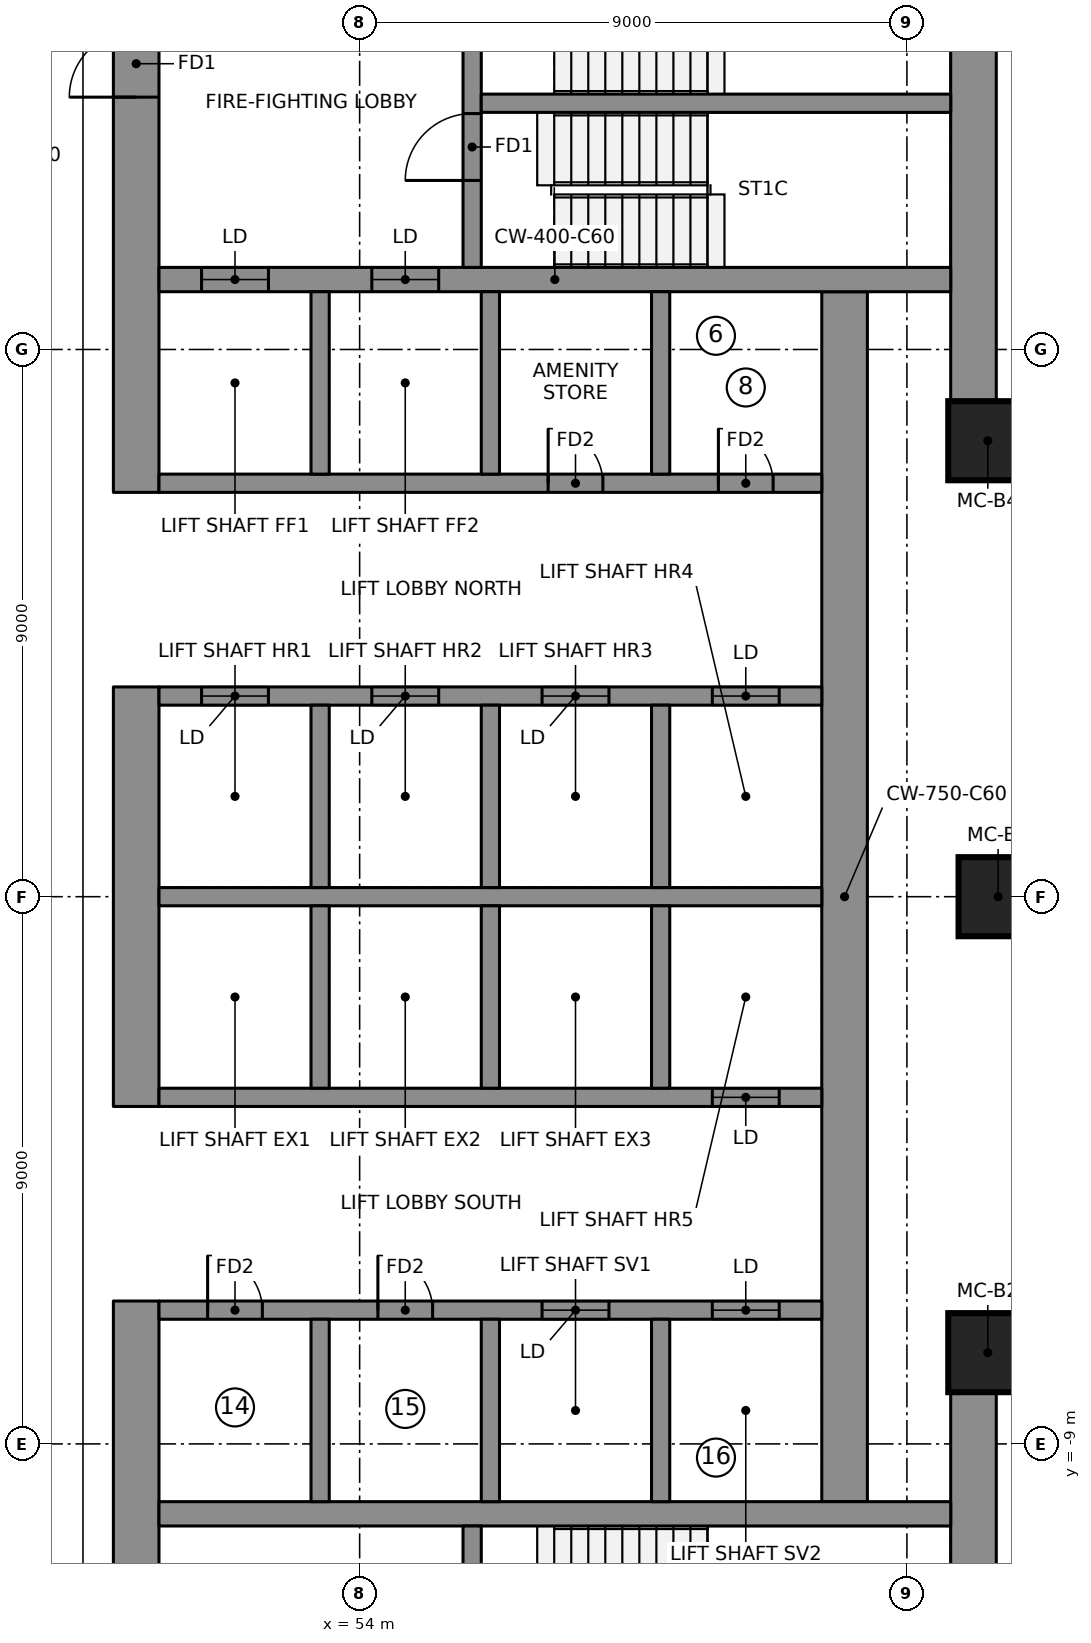
"""IFC4 building model, lengths in metres.
Left out: names, types, materials, properties, quantities, classifications, styles, units other than length and angle.
Written with IfcOpenShell. Run it as: python <this file> out.ifc"""

import sys

from ifc_helpers import new_model, si_unit, direction, frame, frame_2d, origin, origin_2d, place, context, subcontext, project, spatial, rectangle, extrude, element, fill, save


model = new_model("IFC4")
c1 = context("Model", 3, precision=1e-05, world=origin(), true_north=direction((0.0, 1.0)))
c2 = subcontext(c1, "Body", "Model", "MODEL_VIEW")
j1 = project(units=[si_unit("LENGTHUNIT", "METRE"), si_unit("PLANEANGLEUNIT", "RADIAN")], contexts=[c1])
p1 = place(None, origin())
s1 = spatial("IfcSite", under=j1, at=p1, CompositionType="ELEMENT")
p2 = place(p1, origin())
s2 = spatial("IfcBuilding", under=s1, at=p2, CompositionType="ELEMENT")
p3 = place(p2, frame((0.0, 0.0, 189.7)))
s3 = spatial("IfcBuildingStorey", under=s2, at=p3, CompositionType="ELEMENT", Elevation=189.7)
p4 = place(p3, frame((50.325, 6.65, 0.0), z_axis=(0.0, 0.0, 1.0), x_axis=(0.0, 1.0, 0.0)))
e1 = element("IfcWall", 1, at=p4, inside=s3, PredefinedType="SHEAR", context=c2, shape_type="SweptSolid", body=[
    extrude(rectangle(XDim=9.85, YDim=0.75, at=frame_2d((4.925, 0.0))), origin(), (0.0, 0.0, 1.0), 3.55),
])
p5 = place(p4, frame((6.5, 0.0, 0.0)))
e2 = element("IfcOpeningElement", 2, at=p5, cuts=e1, PredefinedType="OPENING", context=c2, shape_type="SweptSolid", body=[
    extrude(rectangle(XDim=1.1, YDim=2.1, at=frame_2d((0.55, 1.05))), frame((0.0, 0.385, 0.0), z_axis=(0.0, -1.0, 0.0), x_axis=(1.0, 0.0, 0.0)), (0.0, 0.0, 1.0), 0.77),
])
p6 = place(p3, frame((50.325, -3.45, 0.0), z_axis=(0.0, 0.0, 1.0), x_axis=(0.0, 1.0, 0.0)))
e3 = element("IfcWall", 3, at=p6, inside=s3, PredefinedType="SHEAR", context=c2, shape_type="SweptSolid", body=[
    extrude(rectangle(XDim=6.9, YDim=0.75, at=frame_2d((3.45, 0.0))), origin(), (0.0, 0.0, 1.0), 3.55),
])
p7 = place(p3, frame((50.325, -16.5, 0.0), z_axis=(0.0, 0.0, 1.0), x_axis=(0.0, 1.0, 0.0)))
e4 = element("IfcWall", 4, at=p7, inside=s3, PredefinedType="SHEAR", context=c2, shape_type="SweptSolid", body=[
    extrude(rectangle(XDim=9.85, YDim=0.75, at=frame_2d((4.925, 0.0))), origin(), (0.0, 0.0, 1.0), 3.55),
])
p8 = place(p7, frame((2.25, 0.0, 0.0)))
e5 = element("IfcOpeningElement", 5, at=p8, cuts=e4, PredefinedType="OPENING", context=c2, shape_type="SweptSolid", body=[
    extrude(rectangle(XDim=1.1, YDim=2.1, at=frame_2d((0.55, 1.05))), frame((0.0, 0.385, 0.0), z_axis=(0.0, -1.0, 0.0), x_axis=(1.0, 0.0, 0.0)), (0.0, 0.0, 1.0), 0.77),
])
for number, where, z_axis, x_axis in (
    (6, (64.095, 8.099, 0.0), (0.0, 0.0, 1.0), (0.0, 1.0, 0.0)),
    (7, (64.095, -15.75, 0.0), (0.0, 0.0, 1.0), (0.0, 1.0, 0.0)),
):
    element("IfcWall", number, at=place(p3, frame(where, z_axis=z_axis, x_axis=x_axis)), inside=s3, PredefinedType="SHEAR", context=c2, shape_type="SweptSolid", body=[
        extrude(rectangle(XDim=7.651, YDim=0.75, at=frame_2d((3.825, 0.0))), origin(), (0.0, 0.0, 1.0), 3.55),
    ])
p9 = place(p3, frame((61.975, -9.95, 0.0), z_axis=(0.0, 0.0, 1.0), x_axis=(0.0, 1.0, 0.0)))
e8 = element("IfcWall", 8, at=p9, inside=s3, PredefinedType="SHEAR", context=c2, shape_type="SweptSolid", body=[
    extrude(rectangle(XDim=19.9, YDim=0.75, at=frame_2d((9.95, 0.0))), origin(), (0.0, 0.0, 1.0), 3.55),
])
p10 = place(p3, frame((50.7, 10.15, 0.0), z_axis=(0.0, 0.0, 1.0), x_axis=(1.0, 0.0, 0.0)))
e9 = element("IfcWall", 9, at=p10, inside=s3, PredefinedType="SHEAR", context=c2, shape_type="SweptSolid", body=[
    extrude(rectangle(XDim=13.02, YDim=0.4, at=frame_2d((6.51, 0.0))), origin(), (0.0, 0.0, 1.0), 3.55),
])
p11 = place(p10, frame((0.7, 0.0, 0.0)))
e10 = element("IfcOpeningElement", 10, at=p11, cuts=e9, PredefinedType="OPENING", context=c2, shape_type="SweptSolid", body=[
    extrude(rectangle(XDim=1.1, YDim=2.1, at=frame_2d((0.55, 1.05))), frame((0.0, 0.21, 0.0), z_axis=(0.0, -1.0, 0.0), x_axis=(1.0, 0.0, 0.0)), (0.0, 0.0, 1.0), 0.42),
])
p12 = place(p10, frame((3.5, 0.0, 0.0)))
e11 = element("IfcOpeningElement", 11, at=p12, cuts=e9, PredefinedType="OPENING", context=c2, shape_type="SweptSolid", body=[
    extrude(rectangle(XDim=1.1, YDim=2.1, at=frame_2d((0.55, 1.05))), frame((0.0, 0.21, 0.0), z_axis=(0.0, -1.0, 0.0), x_axis=(1.0, 0.0, 0.0)), (0.0, 0.0, 1.0), 0.42),
])
p13 = place(p3, frame((50.7, -10.15, 0.0), z_axis=(0.0, 0.0, 1.0), x_axis=(1.0, 0.0, 0.0)))
e12 = element("IfcWall", 12, at=p13, inside=s3, PredefinedType="SHEAR", context=c2, shape_type="SweptSolid", body=[
    extrude(rectangle(XDim=13.02, YDim=0.4, at=frame_2d((6.51, 0.0))), origin(), (0.0, 0.0, 1.0), 3.55),
])
p14 = place(p3, frame((50.7, 0.0, 0.0), z_axis=(0.0, 0.0, 1.0), x_axis=(1.0, 0.0, 0.0)))
e13 = element("IfcWall", 13, at=p14, inside=s3, PredefinedType="SHEAR", context=c2, shape_type="SweptSolid", body=[
    extrude(rectangle(XDim=10.9, YDim=0.3, at=frame_2d((5.45, 0.0))), origin(), (0.0, 0.0, 1.0), 3.55),
])
p15 = place(p3, frame((50.7, 3.3, 0.0), z_axis=(0.0, 0.0, 1.0), x_axis=(1.0, 0.0, 0.0)))
e14 = element("IfcWall", 14, at=p15, inside=s3, PredefinedType="SHEAR", context=c2, shape_type="SweptSolid", body=[
    extrude(rectangle(XDim=10.9, YDim=0.3, at=frame_2d((5.45, 0.0))), origin(), (0.0, 0.0, 1.0), 3.55),
])
p16 = place(p15, frame((0.7, 0.0, 0.0)))
e15 = element("IfcOpeningElement", 15, at=p16, cuts=e14, PredefinedType="OPENING", context=c2, shape_type="SweptSolid", body=[
    extrude(rectangle(XDim=1.1, YDim=2.1, at=frame_2d((0.55, 1.05))), frame((0.0, 0.16, 0.0), z_axis=(0.0, -1.0, 0.0), x_axis=(1.0, 0.0, 0.0)), (0.0, 0.0, 1.0), 0.32),
])
p17 = place(p15, frame((3.5, 0.0, 0.0)))
e16 = element("IfcOpeningElement", 16, at=p17, cuts=e14, PredefinedType="OPENING", context=c2, shape_type="SweptSolid", body=[
    extrude(rectangle(XDim=1.1, YDim=2.1, at=frame_2d((0.55, 1.05))), frame((0.0, 0.16, 0.0), z_axis=(0.0, -1.0, 0.0), x_axis=(1.0, 0.0, 0.0)), (0.0, 0.0, 1.0), 0.32),
])
p18 = place(p15, frame((6.3, 0.0, 0.0)))
e17 = element("IfcOpeningElement", 17, at=p18, cuts=e14, PredefinedType="OPENING", context=c2, shape_type="SweptSolid", body=[
    extrude(rectangle(XDim=1.1, YDim=2.1, at=frame_2d((0.55, 1.05))), frame((0.0, 0.16, 0.0), z_axis=(0.0, -1.0, 0.0), x_axis=(1.0, 0.0, 0.0)), (0.0, 0.0, 1.0), 0.32),
])
p19 = place(p15, frame((9.1, 0.0, 0.0)))
e18 = element("IfcOpeningElement", 18, at=p19, cuts=e14, PredefinedType="OPENING", context=c2, shape_type="SweptSolid", body=[
    extrude(rectangle(XDim=1.1, YDim=2.1, at=frame_2d((0.55, 1.05))), frame((0.0, 0.16, 0.0), z_axis=(0.0, -1.0, 0.0), x_axis=(1.0, 0.0, 0.0)), (0.0, 0.0, 1.0), 0.32),
])
p20 = place(p3, frame((50.7, 6.8, 0.0), z_axis=(0.0, 0.0, 1.0), x_axis=(1.0, 0.0, 0.0)))
e19 = element("IfcWall", 19, at=p20, inside=s3, PredefinedType="SHEAR", context=c2, shape_type="SweptSolid", body=[
    extrude(rectangle(XDim=10.9, YDim=0.3, at=frame_2d((5.45, 0.0))), origin(), (0.0, 0.0, 1.0), 3.55),
])
p21 = place(p20, frame((6.4, 0.0, 0.0)))
e20 = element("IfcOpeningElement", 20, at=p21, cuts=e19, PredefinedType="OPENING", context=c2, shape_type="SweptSolid", body=[
    extrude(rectangle(XDim=0.9, YDim=2.1, at=frame_2d((0.45, 1.05))), frame((0.0, 0.16, 0.0), z_axis=(0.0, -1.0, 0.0), x_axis=(1.0, 0.0, 0.0)), (0.0, 0.0, 1.0), 0.32),
])
p22 = place(p20, frame((9.2, 0.0, 0.0)))
e21 = element("IfcOpeningElement", 21, at=p22, cuts=e19, PredefinedType="OPENING", context=c2, shape_type="SweptSolid", body=[
    extrude(rectangle(XDim=0.9, YDim=2.1, at=frame_2d((0.45, 1.05))), frame((0.0, 0.16, 0.0), z_axis=(0.0, -1.0, 0.0), x_axis=(1.0, 0.0, 0.0)), (0.0, 0.0, 1.0), 0.32),
])
for number, where, z_axis, x_axis in (
    (22, (53.35, 0.15, 0.0), (0.0, 0.0, 1.0), (0.0, 1.0, 0.0)),
    (23, (53.35, 6.95, 0.0), (0.0, 0.0, 1.0), (0.0, 1.0, 0.0)),
    (24, (56.15, 0.15, 0.0), (0.0, 0.0, 1.0), (0.0, 1.0, 0.0)),
    (25, (56.15, 6.95, 0.0), (0.0, 0.0, 1.0), (0.0, 1.0, 0.0)),
    (26, (58.95, 0.15, 0.0), (0.0, 0.0, 1.0), (0.0, 1.0, 0.0)),
    (27, (58.95, 6.95, 0.0), (0.0, 0.0, 1.0), (0.0, 1.0, 0.0)),
):
    element("IfcWall", number, at=place(p3, frame(where, z_axis=z_axis, x_axis=x_axis)), inside=s3, PredefinedType="SHEAR", context=c2, shape_type="SweptSolid", body=[
        extrude(rectangle(XDim=3.0, YDim=0.3, at=frame_2d((1.5, 0.0))), origin(), (0.0, 0.0, 1.0), 3.55),
    ])
p23 = place(p3, frame((50.7, -3.3, 0.0), z_axis=(0.0, 0.0, 1.0), x_axis=(1.0, 0.0, 0.0)))
e28 = element("IfcWall", 28, at=p23, inside=s3, PredefinedType="SHEAR", context=c2, shape_type="SweptSolid", body=[
    extrude(rectangle(XDim=10.9, YDim=0.3, at=frame_2d((5.45, 0.0))), origin(), (0.0, 0.0, 1.0), 3.55),
])
p24 = place(p23, frame((9.1, 0.0, 0.0)))
e29 = element("IfcOpeningElement", 29, at=p24, cuts=e28, PredefinedType="OPENING", context=c2, shape_type="SweptSolid", body=[
    extrude(rectangle(XDim=1.1, YDim=2.1, at=frame_2d((0.55, 1.05))), frame((0.0, 0.16, 0.0), z_axis=(0.0, -1.0, 0.0), x_axis=(1.0, 0.0, 0.0)), (0.0, 0.0, 1.0), 0.32),
])
p25 = place(p3, frame((50.7, -6.8, 0.0), z_axis=(0.0, 0.0, 1.0), x_axis=(1.0, 0.0, 0.0)))
e30 = element("IfcWall", 30, at=p25, inside=s3, PredefinedType="SHEAR", context=c2, shape_type="SweptSolid", body=[
    extrude(rectangle(XDim=10.9, YDim=0.3, at=frame_2d((5.45, 0.0))), origin(), (0.0, 0.0, 1.0), 3.55),
])
p26 = place(p25, frame((6.3, 0.0, 0.0)))
e31 = element("IfcOpeningElement", 31, at=p26, cuts=e30, PredefinedType="OPENING", context=c2, shape_type="SweptSolid", body=[
    extrude(rectangle(XDim=1.1, YDim=2.1, at=frame_2d((0.55, 1.05))), frame((0.0, 0.16, 0.0), z_axis=(0.0, -1.0, 0.0), x_axis=(1.0, 0.0, 0.0)), (0.0, 0.0, 1.0), 0.32),
])
p27 = place(p25, frame((9.1, 0.0, 0.0)))
e32 = element("IfcOpeningElement", 32, at=p27, cuts=e30, PredefinedType="OPENING", context=c2, shape_type="SweptSolid", body=[
    extrude(rectangle(XDim=1.1, YDim=2.1, at=frame_2d((0.55, 1.05))), frame((0.0, 0.16, 0.0), z_axis=(0.0, -1.0, 0.0), x_axis=(1.0, 0.0, 0.0)), (0.0, 0.0, 1.0), 0.32),
])
p28 = place(p25, frame((0.8, 0.0, 0.0)))
e33 = element("IfcOpeningElement", 33, at=p28, cuts=e30, PredefinedType="OPENING", context=c2, shape_type="SweptSolid", body=[
    extrude(rectangle(XDim=0.9, YDim=2.1, at=frame_2d((0.45, 1.05))), frame((0.0, 0.16, 0.0), z_axis=(0.0, -1.0, 0.0), x_axis=(1.0, 0.0, 0.0)), (0.0, 0.0, 1.0), 0.32),
])
p29 = place(p25, frame((3.6, 0.0, 0.0)))
e34 = element("IfcOpeningElement", 34, at=p29, cuts=e30, PredefinedType="OPENING", context=c2, shape_type="SweptSolid", body=[
    extrude(rectangle(XDim=0.9, YDim=2.1, at=frame_2d((0.45, 1.05))), frame((0.0, 0.16, 0.0), z_axis=(0.0, -1.0, 0.0), x_axis=(1.0, 0.0, 0.0)), (0.0, 0.0, 1.0), 0.32),
])
for number, where, z_axis, x_axis in (
    (35, (53.35, -3.15, 0.0), (0.0, 0.0, 1.0), (0.0, 1.0, 0.0)),
    (36, (53.35, -9.95, 0.0), (0.0, 0.0, 1.0), (0.0, 1.0, 0.0)),
    (37, (56.15, -3.15, 0.0), (0.0, 0.0, 1.0), (0.0, 1.0, 0.0)),
    (38, (56.15, -9.95, 0.0), (0.0, 0.0, 1.0), (0.0, 1.0, 0.0)),
    (39, (58.95, -3.15, 0.0), (0.0, 0.0, 1.0), (0.0, 1.0, 0.0)),
    (40, (58.95, -9.95, 0.0), (0.0, 0.0, 1.0), (0.0, 1.0, 0.0)),
):
    element("IfcWall", number, at=place(p3, frame(where, z_axis=z_axis, x_axis=x_axis)), inside=s3, PredefinedType="SHEAR", context=c2, shape_type="SweptSolid", body=[
        extrude(rectangle(XDim=3.0, YDim=0.3, at=frame_2d((1.5, 0.0))), origin(), (0.0, 0.0, 1.0), 3.55),
    ])
p30 = place(p3, frame((55.85, 10.35, 0.0), z_axis=(0.0, 0.0, 1.0), x_axis=(0.0, 1.0, 0.0)))
e41 = element("IfcWall", 41, at=p30, inside=s3, PredefinedType="SHEAR", context=c2, shape_type="SweptSolid", body=[
    extrude(rectangle(XDim=5.4, YDim=0.3, at=frame_2d((2.7, 0.0))), origin(), (0.0, 0.0, 1.0), 3.55),
])
p31 = place(p30, frame((1.43, 0.0, 0.0)))
e42 = element("IfcOpeningElement", 42, at=p31, cuts=e41, PredefinedType="OPENING", context=c2, shape_type="SweptSolid", body=[
    extrude(rectangle(XDim=1.1, YDim=2.1, at=frame_2d((0.55, 1.05))), frame((0.0, 0.16, 0.0), z_axis=(0.0, -1.0, 0.0), x_axis=(1.0, 0.0, 0.0)), (0.0, 0.0, 1.0), 0.32),
])
p32 = place(p30, frame((3.6, 0.0, 0.0)))
e43 = element("IfcOpeningElement", 43, at=p32, cuts=e41, PredefinedType="OPENING", context=c2, shape_type="SweptSolid", body=[
    extrude(rectangle(XDim=1.1, YDim=2.1, at=frame_2d((0.55, 1.05))), frame((0.0, 0.16, 0.0), z_axis=(0.0, -1.0, 0.0), x_axis=(1.0, 0.0, 0.0)), (0.0, 0.0, 1.0), 0.32),
])
p33 = place(p3, frame((55.85, -15.75, 0.0), z_axis=(0.0, 0.0, 1.0), x_axis=(0.0, 1.0, 0.0)))
e44 = element("IfcWall", 44, at=p33, inside=s3, PredefinedType="SHEAR", context=c2, shape_type="SweptSolid", body=[
    extrude(rectangle(XDim=5.4, YDim=0.3, at=frame_2d((2.7, 0.0))), origin(), (0.0, 0.0, 1.0), 3.55),
])
p34 = place(p33, frame((3.6, 0.0, 0.0)))
e45 = element("IfcOpeningElement", 45, at=p34, cuts=e44, PredefinedType="OPENING", context=c2, shape_type="SweptSolid", body=[
    extrude(rectangle(XDim=1.1, YDim=2.1, at=frame_2d((0.55, 1.05))), frame((0.0, 0.16, 0.0), z_axis=(0.0, -1.0, 0.0), x_axis=(1.0, 0.0, 0.0)), (0.0, 0.0, 1.0), 0.32),
])
p35 = place(p33, frame((0.8, 0.0, 0.0)))
e46 = element("IfcOpeningElement", 46, at=p35, cuts=e44, PredefinedType="OPENING", context=c2, shape_type="SweptSolid", body=[
    extrude(rectangle(XDim=0.9, YDim=2.1, at=frame_2d((0.45, 1.05))), frame((0.0, 0.16, 0.0), z_axis=(0.0, -1.0, 0.0), x_axis=(1.0, 0.0, 0.0)), (0.0, 0.0, 1.0), 0.32),
])
p36 = place(p3, frame((56.0, 13.05, 0.0), z_axis=(0.0, 0.0, 1.0), x_axis=(1.0, 0.0, 0.0)))
e47 = element("IfcWall", 47, at=p36, inside=s3, PredefinedType="SHEAR", context=c2, shape_type="SweptSolid", body=[
    extrude(rectangle(XDim=7.72, YDim=0.3, at=frame_2d((3.86, 0.0))), origin(), (0.0, 0.0, 1.0), 3.55),
])
for number, where, z_axis, x_axis in (
    (48, (64.33, -7.499, 0.0), (0.0, 0.0, 1.0), (1.0, 0.0, 0.0)),
    (49, (64.5, 0.0, 0.0), (0.0, 0.0, 1.0), (1.0, 0.0, 0.0)),
    (50, (64.33, 7.499, 0.0), (0.0, 0.0, 1.0), (1.0, 0.0, 0.0)),
):
    element("IfcColumn", number, at=place(p3, frame(where, z_axis=z_axis, x_axis=x_axis)), inside=s3, PredefinedType="COLUMN", context=c2, shape_type="SweptSolid", body=[
        extrude(rectangle(XDim=1.3, YDim=1.3, at=origin_2d()), origin(), (0.0, 0.0, 1.0), 3.55),
    ])
p37 = place(p11, origin())
e51 = element("IfcDoor", 51, at=p37, inside=s3, OperationType="DOUBLE_DOOR_SLIDING", PredefinedType="DOOR", context=c2, shape_type="SweptSolid", body=[
    extrude(rectangle(XDim=1.1, YDim=2.1, at=frame_2d((0.55, 1.05))), frame((0.0, 0.025, 0.0), z_axis=(0.0, -1.0, 0.0), x_axis=(1.0, 0.0, 0.0)), (0.0, 0.0, 1.0), 0.05),
])
fill(e10, e51)
p38 = place(p12, origin())
e52 = element("IfcDoor", 52, at=p38, inside=s3, OperationType="DOUBLE_DOOR_SLIDING", PredefinedType="DOOR", context=c2, shape_type="SweptSolid", body=[
    extrude(rectangle(XDim=1.1, YDim=2.1, at=frame_2d((0.55, 1.05))), frame((0.0, 0.025, 0.0), z_axis=(0.0, -1.0, 0.0), x_axis=(1.0, 0.0, 0.0)), (0.0, 0.0, 1.0), 0.05),
])
fill(e11, e52)
p39 = place(p16, origin())
e53 = element("IfcDoor", 53, at=p39, inside=s3, OperationType="DOUBLE_DOOR_SLIDING", PredefinedType="DOOR", context=c2, shape_type="SweptSolid", body=[
    extrude(rectangle(XDim=1.1, YDim=2.1, at=frame_2d((0.55, 1.05))), frame((0.0, 0.025, 0.0), z_axis=(0.0, -1.0, 0.0), x_axis=(1.0, 0.0, 0.0)), (0.0, 0.0, 1.0), 0.05),
])
fill(e15, e53)
p40 = place(p17, origin())
e54 = element("IfcDoor", 54, at=p40, inside=s3, OperationType="DOUBLE_DOOR_SLIDING", PredefinedType="DOOR", context=c2, shape_type="SweptSolid", body=[
    extrude(rectangle(XDim=1.1, YDim=2.1, at=frame_2d((0.55, 1.05))), frame((0.0, 0.025, 0.0), z_axis=(0.0, -1.0, 0.0), x_axis=(1.0, 0.0, 0.0)), (0.0, 0.0, 1.0), 0.05),
])
fill(e16, e54)
p41 = place(p18, origin())
e55 = element("IfcDoor", 55, at=p41, inside=s3, OperationType="DOUBLE_DOOR_SLIDING", PredefinedType="DOOR", context=c2, shape_type="SweptSolid", body=[
    extrude(rectangle(XDim=1.1, YDim=2.1, at=frame_2d((0.55, 1.05))), frame((0.0, 0.025, 0.0), z_axis=(0.0, -1.0, 0.0), x_axis=(1.0, 0.0, 0.0)), (0.0, 0.0, 1.0), 0.05),
])
fill(e17, e55)
p42 = place(p19, origin())
e56 = element("IfcDoor", 56, at=p42, inside=s3, OperationType="DOUBLE_DOOR_SLIDING", PredefinedType="DOOR", context=c2, shape_type="SweptSolid", body=[
    extrude(rectangle(XDim=1.1, YDim=2.1, at=frame_2d((0.55, 1.05))), frame((0.0, 0.025, 0.0), z_axis=(0.0, -1.0, 0.0), x_axis=(1.0, 0.0, 0.0)), (0.0, 0.0, 1.0), 0.05),
])
fill(e18, e56)
p43 = place(p24, origin())
e57 = element("IfcDoor", 57, at=p43, inside=s3, OperationType="DOUBLE_DOOR_SLIDING", PredefinedType="DOOR", context=c2, shape_type="SweptSolid", body=[
    extrude(rectangle(XDim=1.1, YDim=2.1, at=frame_2d((0.55, 1.05))), frame((0.0, 0.025, 0.0), z_axis=(0.0, -1.0, 0.0), x_axis=(1.0, 0.0, 0.0)), (0.0, 0.0, 1.0), 0.05),
])
fill(e29, e57)
p44 = place(p26, origin())
e58 = element("IfcDoor", 58, at=p44, inside=s3, OperationType="DOUBLE_DOOR_SLIDING", PredefinedType="DOOR", context=c2, shape_type="SweptSolid", body=[
    extrude(rectangle(XDim=1.1, YDim=2.1, at=frame_2d((0.55, 1.05))), frame((0.0, 0.025, 0.0), z_axis=(0.0, -1.0, 0.0), x_axis=(1.0, 0.0, 0.0)), (0.0, 0.0, 1.0), 0.05),
])
fill(e31, e58)
p45 = place(p27, origin())
e59 = element("IfcDoor", 59, at=p45, inside=s3, OperationType="DOUBLE_DOOR_SLIDING", PredefinedType="DOOR", context=c2, shape_type="SweptSolid", body=[
    extrude(rectangle(XDim=1.1, YDim=2.1, at=frame_2d((0.55, 1.05))), frame((0.0, 0.025, 0.0), z_axis=(0.0, -1.0, 0.0), x_axis=(1.0, 0.0, 0.0)), (0.0, 0.0, 1.0), 0.05),
])
fill(e32, e59)
p46 = place(p31, origin())
e60 = element("IfcDoor", 60, at=p46, inside=s3, OperationType="SINGLE_SWING_RIGHT", PredefinedType="DOOR", context=c2, shape_type="SweptSolid", body=[
    extrude(rectangle(XDim=1.1, YDim=2.1, at=frame_2d((0.55, 1.05))), frame((0.0, 0.025, 0.0), z_axis=(0.0, -1.0, 0.0), x_axis=(1.0, 0.0, 0.0)), (0.0, 0.0, 1.0), 0.05),
])
fill(e42, e60)
p47 = place(p5, origin())
e61 = element("IfcDoor", 61, at=p47, inside=s3, OperationType="SINGLE_SWING_RIGHT", PredefinedType="DOOR", context=c2, shape_type="SweptSolid", body=[
    extrude(rectangle(XDim=1.1, YDim=2.1, at=frame_2d((0.55, 1.05))), frame((0.0, 0.025, 0.0), z_axis=(0.0, -1.0, 0.0), x_axis=(1.0, 0.0, 0.0)), (0.0, 0.0, 1.0), 0.05),
])
fill(e2, e61)
p48 = place(p21, origin())
e62 = element("IfcDoor", 62, at=p48, inside=s3, OperationType="SINGLE_SWING_LEFT", PredefinedType="DOOR", context=c2, shape_type="SweptSolid", body=[
    extrude(rectangle(XDim=0.9, YDim=2.1, at=frame_2d((0.45, 1.05))), frame((0.0, 0.025, 0.0), z_axis=(0.0, -1.0, 0.0), x_axis=(1.0, 0.0, 0.0)), (0.0, 0.0, 1.0), 0.05),
])
fill(e20, e62)
p49 = place(p22, origin())
e63 = element("IfcDoor", 63, at=p49, inside=s3, OperationType="SINGLE_SWING_LEFT", PredefinedType="DOOR", context=c2, shape_type="SweptSolid", body=[
    extrude(rectangle(XDim=0.9, YDim=2.1, at=frame_2d((0.45, 1.05))), frame((0.0, 0.025, 0.0), z_axis=(0.0, -1.0, 0.0), x_axis=(1.0, 0.0, 0.0)), (0.0, 0.0, 1.0), 0.05),
])
fill(e21, e63)
p50 = place(p28, origin())
e64 = element("IfcDoor", 64, at=p50, inside=s3, OperationType="SINGLE_SWING_LEFT", PredefinedType="DOOR", context=c2, shape_type="SweptSolid", body=[
    extrude(rectangle(XDim=0.9, YDim=2.1, at=frame_2d((0.45, 1.05))), frame((0.0, 0.025, 0.0), z_axis=(0.0, -1.0, 0.0), x_axis=(1.0, 0.0, 0.0)), (0.0, 0.0, 1.0), 0.05),
])
fill(e33, e64)
p51 = place(p29, origin())
e65 = element("IfcDoor", 65, at=p51, inside=s3, OperationType="SINGLE_SWING_LEFT", PredefinedType="DOOR", context=c2, shape_type="SweptSolid", body=[
    extrude(rectangle(XDim=0.9, YDim=2.1, at=frame_2d((0.45, 1.05))), frame((0.0, 0.025, 0.0), z_axis=(0.0, -1.0, 0.0), x_axis=(1.0, 0.0, 0.0)), (0.0, 0.0, 1.0), 0.05),
])
fill(e34, e65)
save(model, sys.argv[1])
